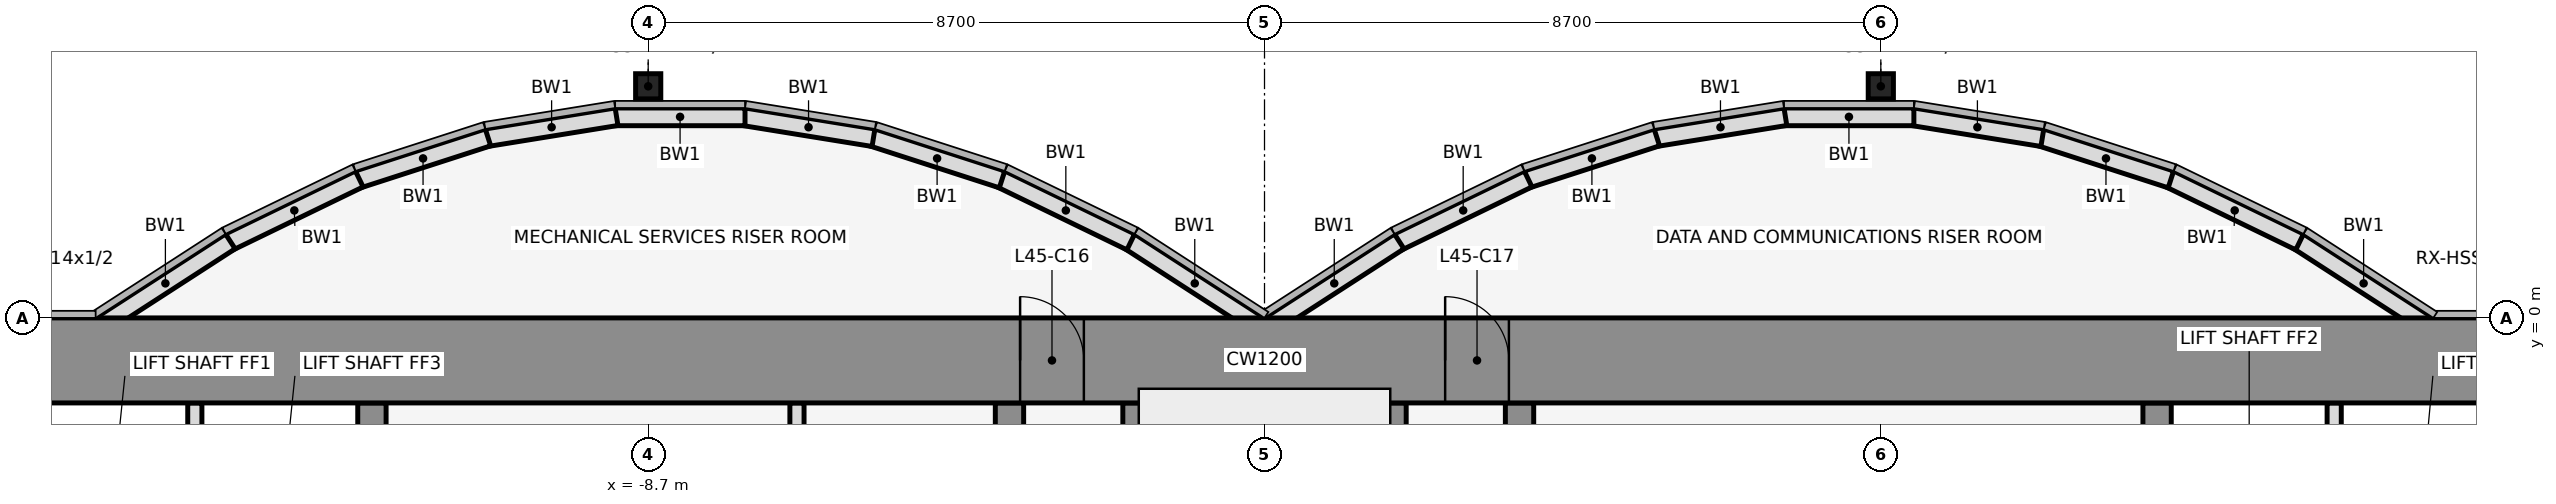
"""IFC4 building model, lengths in metres.
Left out: names, types, materials, properties, quantities, classifications, styles, units other than length and angle.
Written with IfcOpenShell. Run it as: python <this file> out.ifc"""

import sys

from ifc_helpers import new_model, si_unit, direction, frame, frame_2d, origin, origin_2d, place, context, subcontext, project, spatial, rectangle, hollow_rectangle, extrude, element, fill, save


model = new_model("IFC4")
c1 = context("Model", 3, precision=1e-05, world=origin(), true_north=direction((0.0, 1.0)))
c2 = subcontext(c1, "Body", "Model", "MODEL_VIEW")
j1 = project(units=[si_unit("LENGTHUNIT", "METRE"), si_unit("PLANEANGLEUNIT", "RADIAN")], contexts=[c1])
p1 = place(None, origin())
s1 = spatial("IfcSite", under=j1, at=p1, CompositionType="ELEMENT")
p2 = place(p1, origin())
s2 = spatial("IfcBuilding", under=s1, at=p2, CompositionType="ELEMENT")
p3 = place(p2, frame((0.0, 0.0, 203.2)))
s3 = spatial("IfcBuildingStorey", under=s2, at=p3, CompositionType="ELEMENT", Elevation=203.2)
for number, where, z_axis, x_axis in (
    (1, (-8.7, 3.269, 0.0), (0.0, 0.0, 1.0), (1.0, 0.0, 0.0)),
    (2, (8.7, 3.269, 0.0), (0.0, 0.0, 1.0), (1.0, 0.0, 0.0)),
):
    element("IfcColumn", number, at=place(p3, frame(where, z_axis=z_axis, x_axis=x_axis)), inside=s3, PredefinedType="COLUMN", context=c2, shape_type="SweptSolid", body=[
        extrude(hollow_rectangle(XDim=0.356, YDim=0.356, WallThickness=0.012, at=origin_2d()), origin(), (0.0, 0.0, 1.0), 4.1),
    ])
p4 = place(p3, frame((16.432, -0.105, 0.0), z_axis=(0.0, 0.0, 1.0), x_axis=(-0.83981312244, 0.542875602121, 0.0)))
e3 = element("IfcWall", 3, at=p4, inside=s3, PredefinedType="STANDARD", context=c2, shape_type="SweptSolid", body=[
    extrude(rectangle(XDim=2.183, YDim=0.25, at=frame_2d((1.091, 0.0))), origin(), (0.0, 0.0, 1.0), 3.95),
])
p5 = place(p3, frame((14.612, 1.073, 0.0), z_axis=(0.0, 0.0, 1.0), x_axis=(-0.89982408427, 0.436252928206, 0.0)))
e4 = element("IfcWall", 4, at=p5, inside=s3, PredefinedType="STANDARD", context=c2, shape_type="SweptSolid", body=[
    extrude(rectangle(XDim=2.038, YDim=0.25, at=frame_2d((1.019, 0.0))), origin(), (0.0, 0.0, 1.0), 3.95),
])
p6 = place(p3, frame((12.795, 1.955, 0.0), z_axis=(0.0, 0.0, 1.0), x_axis=(-0.951495806175, 0.307661714928, 0.0)))
e5 = element("IfcWall", 5, at=p6, inside=s3, PredefinedType="STANDARD", context=c2, shape_type="SweptSolid", body=[
    extrude(rectangle(XDim=1.927, YDim=0.25, at=frame_2d((0.963, 0.0))), origin(), (0.0, 0.0, 1.0), 3.95),
])
p7 = place(p3, frame((10.98, 2.543, 0.0), z_axis=(0.0, 0.0, 1.0), x_axis=(-0.987181718931, 0.159600293885, 0.0)))
e6 = element("IfcWall", 6, at=p7, inside=s3, PredefinedType="STANDARD", context=c2, shape_type="SweptSolid", body=[
    extrude(rectangle(XDim=1.857, YDim=0.25, at=frame_2d((0.929, 0.0))), origin(), (0.0, 0.0, 1.0), 3.95),
])
p8 = place(p3, frame((9.167, 2.838, 0.0), z_axis=(0.0, 0.0, 1.0), x_axis=(-1.0, 0.0, 0.0)))
e7 = element("IfcWall", 7, at=p8, inside=s3, PredefinedType="STANDARD", context=c2, shape_type="SweptSolid", body=[
    extrude(rectangle(XDim=1.833, YDim=0.25, at=frame_2d((0.917, 0.0))), origin(), (0.0, 0.0, 1.0), 3.95),
])
p9 = place(p3, frame((7.353, 2.84, 0.0), z_axis=(0.0, 0.0, 1.0), x_axis=(-0.987181718931, -0.159600293885, 0.0)))
e8 = element("IfcWall", 8, at=p9, inside=s3, PredefinedType="STANDARD", context=c2, shape_type="SweptSolid", body=[
    extrude(rectangle(XDim=1.857, YDim=0.25, at=frame_2d((0.929, 0.0))), origin(), (0.0, 0.0, 1.0), 3.95),
])
p10 = place(p3, frame((5.538, 2.548, 0.0), z_axis=(0.0, 0.0, 1.0), x_axis=(-0.951495806175, -0.307661714928, 0.0)))
e9 = element("IfcWall", 9, at=p10, inside=s3, PredefinedType="STANDARD", context=c2, shape_type="SweptSolid", body=[
    extrude(rectangle(XDim=1.927, YDim=0.25, at=frame_2d((0.963, 0.0))), origin(), (0.0, 0.0, 1.0), 3.95),
])
p11 = place(p3, frame((3.721, 1.962, 0.0), z_axis=(0.0, 0.0, 1.0), x_axis=(-0.89982408427, -0.436252928206, 0.0)))
e10 = element("IfcWall", 10, at=p11, inside=s3, PredefinedType="STANDARD", context=c2, shape_type="SweptSolid", body=[
    extrude(rectangle(XDim=2.038, YDim=0.25, at=frame_2d((1.019, 0.0))), origin(), (0.0, 0.0, 1.0), 3.95),
])
for number, where, z_axis, x_axis in (
    (11, (1.901, 1.08, 0.0), (0.0, 0.0, 1.0), (-0.84, -0.543, 0.0)),
    (12, (-0.068, -0.105, 0.0), (0.0, 0.0, 1.0), (-0.84, 0.543, 0.0)),
):
    element("IfcWall", number, at=place(p3, frame(where, z_axis=z_axis, x_axis=x_axis)), inside=s3, PredefinedType="STANDARD", context=c2, shape_type="SweptSolid", body=[
        extrude(rectangle(XDim=2.183, YDim=0.25, at=frame_2d((1.091, 0.0))), origin(), (0.0, 0.0, 1.0), 3.95),
    ])
p12 = place(p3, frame((-1.888, 1.073, 0.0), z_axis=(0.0, 0.0, 1.0), x_axis=(-0.89982408427, 0.436252928206, 0.0)))
e13 = element("IfcWall", 13, at=p12, inside=s3, PredefinedType="STANDARD", context=c2, shape_type="SweptSolid", body=[
    extrude(rectangle(XDim=2.038, YDim=0.25, at=frame_2d((1.019, 0.0))), origin(), (0.0, 0.0, 1.0), 3.95),
])
p13 = place(p3, frame((-3.705, 1.955, 0.0), z_axis=(0.0, 0.0, 1.0), x_axis=(-0.951495806175, 0.307661714928, 0.0)))
e14 = element("IfcWall", 14, at=p13, inside=s3, PredefinedType="STANDARD", context=c2, shape_type="SweptSolid", body=[
    extrude(rectangle(XDim=1.927, YDim=0.25, at=frame_2d((0.963, 0.0))), origin(), (0.0, 0.0, 1.0), 3.95),
])
p14 = place(p3, frame((-5.52, 2.543, 0.0), z_axis=(0.0, 0.0, 1.0), x_axis=(-0.987181718931, 0.159600293885, 0.0)))
e15 = element("IfcWall", 15, at=p14, inside=s3, PredefinedType="STANDARD", context=c2, shape_type="SweptSolid", body=[
    extrude(rectangle(XDim=1.857, YDim=0.25, at=frame_2d((0.929, 0.0))), origin(), (0.0, 0.0, 1.0), 3.95),
])
p15 = place(p3, frame((-7.333, 2.838, 0.0), z_axis=(0.0, 0.0, 1.0), x_axis=(-1.0, 0.0, 0.0)))
e16 = element("IfcWall", 16, at=p15, inside=s3, PredefinedType="STANDARD", context=c2, shape_type="SweptSolid", body=[
    extrude(rectangle(XDim=1.833, YDim=0.25, at=frame_2d((0.917, 0.0))), origin(), (0.0, 0.0, 1.0), 3.95),
])
p16 = place(p3, frame((-9.147, 2.84, 0.0), z_axis=(0.0, 0.0, 1.0), x_axis=(-0.987181718931, -0.159600293885, 0.0)))
e17 = element("IfcWall", 17, at=p16, inside=s3, PredefinedType="STANDARD", context=c2, shape_type="SweptSolid", body=[
    extrude(rectangle(XDim=1.857, YDim=0.25, at=frame_2d((0.929, 0.0))), origin(), (0.0, 0.0, 1.0), 3.95),
])
p17 = place(p3, frame((-10.962, 2.548, 0.0), z_axis=(0.0, 0.0, 1.0), x_axis=(-0.951495806175, -0.307661714928, 0.0)))
e18 = element("IfcWall", 18, at=p17, inside=s3, PredefinedType="STANDARD", context=c2, shape_type="SweptSolid", body=[
    extrude(rectangle(XDim=1.927, YDim=0.25, at=frame_2d((0.963, 0.0))), origin(), (0.0, 0.0, 1.0), 3.95),
])
p18 = place(p3, frame((-12.779, 1.962, 0.0), z_axis=(0.0, 0.0, 1.0), x_axis=(-0.89982408427, -0.436252928206, 0.0)))
e19 = element("IfcWall", 19, at=p18, inside=s3, PredefinedType="STANDARD", context=c2, shape_type="SweptSolid", body=[
    extrude(rectangle(XDim=2.038, YDim=0.25, at=frame_2d((1.019, 0.0))), origin(), (0.0, 0.0, 1.0), 3.95),
])
p19 = place(p3, frame((-14.599, 1.08, 0.0), z_axis=(0.0, 0.0, 1.0), x_axis=(-0.83981312244, -0.542875602121, 0.0)))
e20 = element("IfcWall", 20, at=p19, inside=s3, PredefinedType="STANDARD", context=c2, shape_type="SweptSolid", body=[
    extrude(rectangle(XDim=2.183, YDim=0.25, at=frame_2d((1.091, 0.0))), origin(), (0.0, 0.0, 1.0), 3.95),
])
p20 = place(p3, frame((-15.1, -4.6, 0.0), z_axis=(0.0, 0.0, 1.0), x_axis=(0.0, 1.0, 0.0)))
e21 = element("IfcWall", 21, at=p20, inside=s3, PredefinedType="PARTITIONING", context=c2, shape_type="SweptSolid", body=[
    extrude(rectangle(XDim=3.4, YDim=0.2, at=frame_2d((1.7, 0.0))), origin(), (0.0, 0.0, 1.0), 2.84),
])
p21 = place(p3, frame((-12.6, -11.8, 0.0), z_axis=(0.0, 0.0, 1.0), x_axis=(0.0, 1.0, 0.0)))
e22 = element("IfcWall", 22, at=p21, inside=s3, PredefinedType="SHEAR", context=c2, shape_type="SweptSolid", body=[
    extrude(rectangle(XDim=10.6, YDim=0.4, at=frame_2d((5.3, 0.0))), origin(), (0.0, 0.0, 1.0), 4.1),
])
p22 = place(p21, frame((4.75, 0.0, 0.0)))
e23 = element("IfcOpeningElement", 23, at=p22, cuts=e22, PredefinedType="OPENING", context=c2, shape_type="SweptSolid", body=[
    extrude(rectangle(XDim=1.1, YDim=2.1, at=frame_2d((0.55, 1.05))), frame((0.0, 0.212, 0.0), z_axis=(0.0, -1.0, 0.0), x_axis=(1.0, 0.0, 0.0)), (0.0, 0.0, 1.0), 0.424),
])
p23 = place(p3, frame((-6.6, -4.6, 0.0), z_axis=(0.0, 0.0, 1.0), x_axis=(0.0, 1.0, 0.0)))
e24 = element("IfcWall", 24, at=p23, inside=s3, PredefinedType="PARTITIONING", context=c2, shape_type="SweptSolid", body=[
    extrude(rectangle(XDim=3.4, YDim=0.2, at=frame_2d((1.7, 0.0))), origin(), (0.0, 0.0, 1.0), 2.84),
])
p24 = place(p3, frame((-3.6, -11.8, 0.0), z_axis=(0.0, 0.0, 1.0), x_axis=(0.0, 1.0, 0.0)))
e25 = element("IfcWall", 25, at=p24, inside=s3, PredefinedType="SHEAR", context=c2, shape_type="SweptSolid", body=[
    extrude(rectangle(XDim=10.6, YDim=0.4, at=frame_2d((5.3, 0.0))), origin(), (0.0, 0.0, 1.0), 4.1),
])
p25 = place(p24, frame((4.85, 0.0, 0.0)))
e26 = element("IfcOpeningElement", 26, at=p25, cuts=e25, PredefinedType="OPENING", context=c2, shape_type="SweptSolid", body=[
    extrude(rectangle(XDim=0.9, YDim=2.1, at=frame_2d((0.45, 1.05))), frame((0.0, 0.212, 0.0), z_axis=(0.0, -1.0, 0.0), x_axis=(1.0, 0.0, 0.0)), (0.0, 0.0, 1.0), 0.424),
])
for number, where, z_axis, x_axis in (
    (27, (-1.8, -11.8, 0.0), (0.0, 0.0, 1.0), (0.0, 1.0, 0.0)),
    (28, (1.8, -11.8, 0.0), (0.0, 0.0, 1.0), (0.0, 1.0, 0.0)),
):
    element("IfcWall", number, at=place(p3, frame(where, z_axis=z_axis, x_axis=x_axis)), inside=s3, PredefinedType="SHEAR", context=c2, shape_type="SweptSolid", body=[
        extrude(rectangle(XDim=10.6, YDim=0.4, at=frame_2d((5.3, 0.0))), origin(), (0.0, 0.0, 1.0), 4.1),
    ])
p26 = place(p3, frame((3.6, -11.8, 0.0), z_axis=(0.0, 0.0, 1.0), x_axis=(0.0, 1.0, 0.0)))
e29 = element("IfcWall", 29, at=p26, inside=s3, PredefinedType="SHEAR", context=c2, shape_type="SweptSolid", body=[
    extrude(rectangle(XDim=10.6, YDim=0.4, at=frame_2d((5.3, 0.0))), origin(), (0.0, 0.0, 1.0), 4.1),
])
p27 = place(p26, frame((1.35, 0.0, 0.0)))
e30 = element("IfcOpeningElement", 30, at=p27, cuts=e29, PredefinedType="OPENING", context=c2, shape_type="SweptSolid", body=[
    extrude(rectangle(XDim=0.9, YDim=2.1, at=frame_2d((0.45, 1.05))), frame((0.0, 0.212, 0.0), z_axis=(0.0, -1.0, 0.0), x_axis=(1.0, 0.0, 0.0)), (0.0, 0.0, 1.0), 0.424),
])
p28 = place(p3, frame((12.6, -11.8, 0.0), z_axis=(0.0, 0.0, 1.0), x_axis=(0.0, 1.0, 0.0)))
e31 = element("IfcWall", 31, at=p28, inside=s3, PredefinedType="SHEAR", context=c2, shape_type="SweptSolid", body=[
    extrude(rectangle(XDim=10.6, YDim=0.4, at=frame_2d((5.3, 0.0))), origin(), (0.0, 0.0, 1.0), 4.1),
])
p29 = place(p28, frame((1.25, 0.0, 0.0)))
e32 = element("IfcOpeningElement", 32, at=p29, cuts=e31, PredefinedType="OPENING", context=c2, shape_type="SweptSolid", body=[
    extrude(rectangle(XDim=1.2, YDim=2.1, at=frame_2d((0.6, 1.05))), frame((0.0, 0.212, 0.0), z_axis=(0.0, -1.0, 0.0), x_axis=(1.0, 0.0, 0.0)), (0.0, 0.0, 1.0), 0.424),
])
p30 = place(p28, frame((4.75, 0.0, 0.0)))
e33 = element("IfcOpeningElement", 33, at=p30, cuts=e31, PredefinedType="OPENING", context=c2, shape_type="SweptSolid", body=[
    extrude(rectangle(XDim=1.1, YDim=2.1, at=frame_2d((0.55, 1.05))), frame((0.0, 0.212, 0.0), z_axis=(0.0, -1.0, 0.0), x_axis=(1.0, 0.0, 0.0)), (0.0, 0.0, 1.0), 0.424),
])
p31 = place(p3, frame((15.1, -4.6, 0.0), z_axis=(0.0, 0.0, 1.0), x_axis=(0.0, 1.0, 0.0)))
e34 = element("IfcWall", 34, at=p31, inside=s3, PredefinedType="PARTITIONING", context=c2, shape_type="SweptSolid", body=[
    extrude(rectangle(XDim=3.4, YDim=0.2, at=frame_2d((1.7, 0.0))), origin(), (0.0, 0.0, 1.0), 2.84),
])
p32 = place(p3, frame((-22.0, -0.6, 0.0), z_axis=(0.0, 0.0, 1.0), x_axis=(1.0, 0.0, 0.0)))
e35 = element("IfcWall", 35, at=p32, inside=s3, PredefinedType="SHEAR", context=c2, shape_type="SweptSolid", body=[
    extrude(rectangle(XDim=44.0, YDim=1.2, at=frame_2d((22.0, 0.0))), origin(), (0.0, 0.0, 1.0), 4.1),
])
p33 = place(p32, frame((18.55, 0.0, 0.0)))
e36 = element("IfcOpeningElement", 36, at=p33, cuts=e35, PredefinedType="OPENING", context=c2, shape_type="SweptSolid", body=[
    extrude(rectangle(XDim=0.9, YDim=2.1, at=frame_2d((0.45, 1.05))), frame((0.0, 0.612, 0.0), z_axis=(0.0, -1.0, 0.0), x_axis=(1.0, 0.0, 0.0)), (0.0, 0.0, 1.0), 1.224),
])
p34 = place(p32, frame((24.55, 0.0, 0.0)))
e37 = element("IfcOpeningElement", 37, at=p34, cuts=e35, PredefinedType="OPENING", context=c2, shape_type="SweptSolid", body=[
    extrude(rectangle(XDim=0.9, YDim=2.1, at=frame_2d((0.45, 1.05))), frame((0.0, 0.612, 0.0), z_axis=(0.0, -1.0, 0.0), x_axis=(1.0, 0.0, 0.0)), (0.0, 0.0, 1.0), 1.224),
])
p35 = place(p33, origin())
e38 = element("IfcDoor", 38, at=p35, inside=s3, OperationType="SINGLE_SWING_LEFT", PredefinedType="DOOR", context=c2, shape_type="SweptSolid", body=[
    extrude(rectangle(XDim=0.9, YDim=2.1, at=frame_2d((0.45, 1.05))), frame((0.0, 0.025, 0.0), z_axis=(0.0, -1.0, 0.0), x_axis=(1.0, 0.0, 0.0)), (0.0, 0.0, 1.0), 0.05),
])
fill(e36, e38)
p36 = place(p34, origin())
e39 = element("IfcDoor", 39, at=p36, inside=s3, OperationType="SINGLE_SWING_LEFT", PredefinedType="DOOR", context=c2, shape_type="SweptSolid", body=[
    extrude(rectangle(XDim=0.9, YDim=2.1, at=frame_2d((0.45, 1.05))), frame((0.0, 0.025, 0.0), z_axis=(0.0, -1.0, 0.0), x_axis=(1.0, 0.0, 0.0)), (0.0, 0.0, 1.0), 0.05),
])
fill(e37, e39)
save(model, sys.argv[1])
